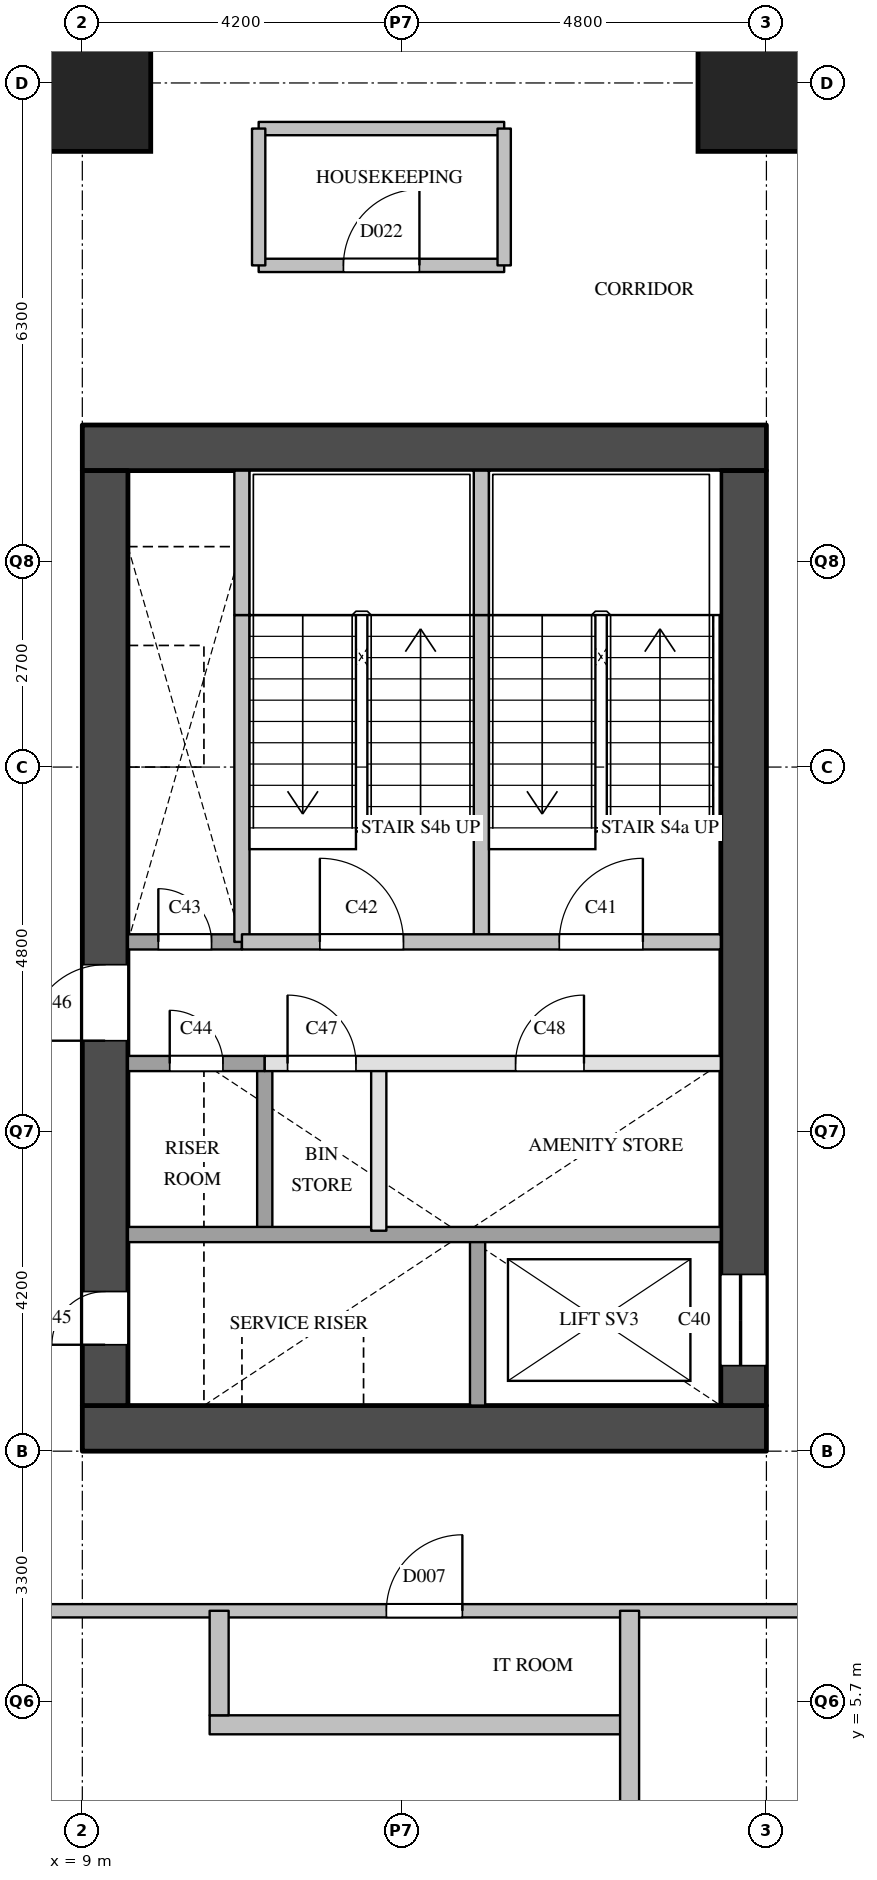
"""IFC4 building model, lengths in metres.
Left out: names, types, materials, properties, quantities, classifications, styles, units other than length and angle.
Written with IfcOpenShell. Run it as: python <this file> out.ifc"""

import sys

from ifc_helpers import new_model, si_unit, direction, frame, frame_2d, origin, origin_2d, place, context, subcontext, project, spatial, rectangle, extrude, element, fill, save


model = new_model("IFC4")
c1 = context("Model", 3, precision=1e-05, world=origin(), true_north=direction((0.0, 1.0)))
c2 = subcontext(c1, "Body", "Model", "MODEL_VIEW")
j1 = project(units=[si_unit("LENGTHUNIT", "METRE"), si_unit("PLANEANGLEUNIT", "RADIAN")], contexts=[c1])
p1 = place(None, origin())
s1 = spatial("IfcSite", under=j1, at=p1, CompositionType="ELEMENT")
p2 = place(p1, origin())
s2 = spatial("IfcBuilding", under=s1, at=p2, CompositionType="ELEMENT")
p3 = place(p2, frame((0.0, 0.0, 53.8)))
s3 = spatial("IfcBuildingStorey", under=s2, at=p3, CompositionType="ELEMENT", Elevation=53.8)
for number, where, z_axis, x_axis in (
    (1, (9.0, 27.0, 0.0), (0.0, 0.0, 1.0), (1.0, 0.0, 0.0)),
    (2, (18.0, 27.0, 0.0), (0.0, 0.0, 1.0), (1.0, 0.0, 0.0)),
):
    element("IfcColumn", number, at=place(p3, frame(where, z_axis=z_axis, x_axis=x_axis)), inside=s3, PredefinedType="COLUMN", context=c2, shape_type="SweptSolid", body=[
        extrude(rectangle(XDim=1.8, YDim=1.8, at=origin_2d()), origin(), (0.0, 0.0, 1.0), 3.8),
    ])
for number, where, z_axis, x_axis in (
    (3, (9.0, 9.3, 0.0), (0.0, 0.0, 1.0), (1.0, 0.0, 0.0)),
    (4, (9.0, 22.2, 0.0), (0.0, 0.0, 1.0), (1.0, 0.0, 0.0)),
):
    element("IfcWall", number, at=place(p3, frame(where, z_axis=z_axis, x_axis=x_axis)), inside=s3, PredefinedType="SHEAR", context=c2, shape_type="SweptSolid", body=[
        extrude(rectangle(XDim=9.0, YDim=0.6, at=frame_2d((4.5, 0.0))), origin(), (0.0, 0.0, 1.0), 3.5),
    ])
p4 = place(p3, frame((9.3, 9.6, 0.0), z_axis=(0.0, 0.0, 1.0), x_axis=(0.0, 1.0, 0.0)))
e5 = element("IfcWall", 5, at=p4, inside=s3, PredefinedType="SHEAR", context=c2, shape_type="SweptSolid", body=[
    extrude(rectangle(XDim=12.3, YDim=0.6, at=frame_2d((6.15, 0.0))), origin(), (0.0, 0.0, 1.0), 3.5),
])
p5 = place(p4, frame((0.8, 0.0, 0.0)))
e6 = element("IfcOpeningElement", 6, at=p5, cuts=e5, PredefinedType="OPENING", context=c2, shape_type="SweptSolid", body=[
    extrude(rectangle(XDim=0.7, YDim=2.1, at=frame_2d((0.35, 1.05))), frame((0.0, 0.31, 0.0), z_axis=(0.0, -1.0, 0.0), x_axis=(1.0, 0.0, 0.0)), (0.0, 0.0, 1.0), 0.62),
])
p6 = place(p4, frame((4.8, 0.0, 0.0)))
e7 = element("IfcOpeningElement", 7, at=p6, cuts=e5, PredefinedType="OPENING", context=c2, shape_type="SweptSolid", body=[
    extrude(rectangle(XDim=1.0, YDim=2.1, at=frame_2d((0.5, 1.05))), frame((0.0, 0.31, 0.0), z_axis=(0.0, -1.0, 0.0), x_axis=(1.0, 0.0, 0.0)), (0.0, 0.0, 1.0), 0.62),
])
p7 = place(p3, frame((17.7, 9.6, 0.0), z_axis=(0.0, 0.0, 1.0), x_axis=(0.0, 1.0, 0.0)))
e8 = element("IfcWall", 8, at=p7, inside=s3, PredefinedType="SHEAR", context=c2, shape_type="SweptSolid", body=[
    extrude(rectangle(XDim=12.3, YDim=0.6, at=frame_2d((6.15, 0.0))), origin(), (0.0, 0.0, 1.0), 3.5),
])
p8 = place(p7, frame((0.525, 0.0, 0.0)))
e9 = element("IfcOpeningElement", 9, at=p8, cuts=e8, PredefinedType="OPENING", context=c2, shape_type="SweptSolid", body=[
    extrude(rectangle(XDim=1.2, YDim=2.1, at=frame_2d((0.6, 1.05))), frame((0.0, 0.31, 0.0), z_axis=(0.0, -1.0, 0.0), x_axis=(1.0, 0.0, 0.0)), (0.0, 0.0, 1.0), 0.62),
])
p9 = place(p3, frame((11.1, 15.7, 0.0), z_axis=(0.0, 0.0, 1.0), x_axis=(0.0, 1.0, 0.0)))
e10 = element("IfcWall", 10, at=p9, inside=s3, PredefinedType="SOLIDWALL", context=c2, shape_type="SweptSolid", body=[
    extrude(rectangle(XDim=4.3, YDim=0.2, at=frame_2d((2.15, 0.0))), origin(), (0.0, 0.0, 1.0), 3.5),
])
p10 = place(p3, frame((11.1, 20.0, 0.0), z_axis=(0.0, 0.0, 1.0), x_axis=(0.0, 1.0, 0.0)))
e11 = element("IfcWall", 11, at=p10, inside=s3, PredefinedType="SOLIDWALL", context=c2, shape_type="SweptSolid", body=[
    extrude(rectangle(XDim=1.9, YDim=0.2, at=frame_2d((0.95, 0.0))), origin(), (0.0, 0.0, 1.0), 3.5),
])
p11 = place(p3, frame((11.4, 11.9, 0.0), z_axis=(0.0, 0.0, 1.0), x_axis=(0.0, 1.0, 0.0)))
e12 = element("IfcWall", 12, at=p11, inside=s3, PredefinedType="SOLIDWALL", context=c2, shape_type="SweptSolid", body=[
    extrude(rectangle(XDim=2.2, YDim=0.2, at=frame_2d((1.1, 0.0))), origin(), (0.0, 0.0, 1.0), 3.5),
])
p12 = place(p3, frame((12.9, 11.9, 0.0), z_axis=(0.0, 0.0, 1.0), x_axis=(0.0, 1.0, 0.0)))
e13 = element("IfcWall", 13, at=p12, inside=s3, PredefinedType="PARTITIONING", context=c2, shape_type="SweptSolid", body=[
    extrude(rectangle(XDim=2.2, YDim=0.2, at=frame_2d((1.1, 0.0))), origin(), (0.0, 0.0, 1.0), 3.5),
])
p13 = place(p3, frame((14.2, 9.6, 0.0), z_axis=(0.0, 0.0, 1.0), x_axis=(0.0, 1.0, 0.0)))
e14 = element("IfcWall", 14, at=p13, inside=s3, PredefinedType="SOLIDWALL", context=c2, shape_type="SweptSolid", body=[
    extrude(rectangle(XDim=2.3, YDim=0.2, at=frame_2d((1.15, 0.0))), origin(), (0.0, 0.0, 1.0), 3.5),
])
p14 = place(p3, frame((14.25, 15.7, 0.0), z_axis=(0.0, 0.0, 1.0), x_axis=(0.0, 1.0, 0.0)))
e15 = element("IfcWall", 15, at=p14, inside=s3, PredefinedType="SOLIDWALL", context=c2, shape_type="SweptSolid", body=[
    extrude(rectangle(XDim=4.3, YDim=0.2, at=frame_2d((2.15, 0.0))), origin(), (0.0, 0.0, 1.0), 3.5),
])
p15 = place(p3, frame((14.25, 20.0, 0.0), z_axis=(0.0, 0.0, 1.0), x_axis=(0.0, 1.0, 0.0)))
e16 = element("IfcWall", 16, at=p15, inside=s3, PredefinedType="SOLIDWALL", context=c2, shape_type="SweptSolid", body=[
    extrude(rectangle(XDim=1.9, YDim=0.2, at=frame_2d((0.95, 0.0))), origin(), (0.0, 0.0, 1.0), 3.5),
])
p16 = place(p3, frame((9.6, 11.85, 0.0), z_axis=(0.0, 0.0, 1.0), x_axis=(1.0, 0.0, 0.0)))
e17 = element("IfcWall", 17, at=p16, inside=s3, PredefinedType="SOLIDWALL", context=c2, shape_type="SweptSolid", body=[
    extrude(rectangle(XDim=7.8, YDim=0.2, at=frame_2d((3.9, 0.0))), origin(), (0.0, 0.0, 1.0), 3.5),
])
p17 = place(p3, frame((11.4, 14.1, 0.0), z_axis=(0.0, 0.0, 1.0), x_axis=(1.0, 0.0, 0.0)))
e18 = element("IfcWall", 18, at=p17, inside=s3, PredefinedType="PARTITIONING", context=c2, shape_type="SweptSolid", body=[
    extrude(rectangle(XDim=6.0, YDim=0.2, at=frame_2d((3.0, 0.0))), origin(), (0.0, 0.0, 1.0), 3.5),
])
p18 = place(p17, frame((0.3, 0.0, 0.0)))
e19 = element("IfcOpeningElement", 19, at=p18, cuts=e18, PredefinedType="OPENING", context=c2, shape_type="SweptSolid", body=[
    extrude(rectangle(XDim=0.9, YDim=2.1, at=frame_2d((0.45, 1.05))), frame((0.0, 0.11, 0.0), z_axis=(0.0, -1.0, 0.0), x_axis=(1.0, 0.0, 0.0)), (0.0, 0.0, 1.0), 0.22),
])
p19 = place(p17, frame((3.3, 0.0, 0.0)))
e20 = element("IfcOpeningElement", 20, at=p19, cuts=e18, PredefinedType="OPENING", context=c2, shape_type="SweptSolid", body=[
    extrude(rectangle(XDim=0.9, YDim=2.1, at=frame_2d((0.45, 1.05))), frame((0.0, 0.11, 0.0), z_axis=(0.0, -1.0, 0.0), x_axis=(1.0, 0.0, 0.0)), (0.0, 0.0, 1.0), 0.22),
])
p20 = place(p3, frame((9.6, 14.1, 0.0), z_axis=(0.0, 0.0, 1.0), x_axis=(1.0, 0.0, 0.0)))
e21 = element("IfcWall", 21, at=p20, inside=s3, PredefinedType="SOLIDWALL", context=c2, shape_type="SweptSolid", body=[
    extrude(rectangle(XDim=1.8, YDim=0.2, at=frame_2d((0.9, 0.0))), origin(), (0.0, 0.0, 1.0), 3.5),
])
p21 = place(p20, frame((0.55, 0.0, 0.0)))
e22 = element("IfcOpeningElement", 22, at=p21, cuts=e21, PredefinedType="OPENING", context=c2, shape_type="SweptSolid", body=[
    extrude(rectangle(XDim=0.7, YDim=2.1, at=frame_2d((0.35, 1.05))), frame((0.0, 0.11, 0.0), z_axis=(0.0, -1.0, 0.0), x_axis=(1.0, 0.0, 0.0)), (0.0, 0.0, 1.0), 0.22),
])
p22 = place(p3, frame((9.6, 15.7, 0.0), z_axis=(0.0, 0.0, 1.0), x_axis=(1.0, 0.0, 0.0)))
e23 = element("IfcWall", 23, at=p22, inside=s3, PredefinedType="SOLIDWALL", context=c2, shape_type="SweptSolid", body=[
    extrude(rectangle(XDim=1.5, YDim=0.2, at=frame_2d((0.75, 0.0))), origin(), (0.0, 0.0, 1.0), 3.5),
])
p23 = place(p22, frame((0.4, 0.0, 0.0)))
e24 = element("IfcOpeningElement", 24, at=p23, cuts=e23, PredefinedType="OPENING", context=c2, shape_type="SweptSolid", body=[
    extrude(rectangle(XDim=0.7, YDim=2.1, at=frame_2d((0.35, 1.05))), frame((0.0, 0.11, 0.0), z_axis=(0.0, -1.0, 0.0), x_axis=(1.0, 0.0, 0.0)), (0.0, 0.0, 1.0), 0.22),
])
p24 = place(p3, frame((11.1, 15.7, 0.0), z_axis=(0.0, 0.0, 1.0), x_axis=(1.0, 0.0, 0.0)))
e25 = element("IfcWall", 25, at=p24, inside=s3, PredefinedType="SOLIDWALL", context=c2, shape_type="SweptSolid", body=[
    extrude(rectangle(XDim=6.3, YDim=0.2, at=frame_2d((3.15, 0.0))), origin(), (0.0, 0.0, 1.0), 3.5),
])
p25 = place(p24, frame((4.175, 0.0, 0.0)))
e26 = element("IfcOpeningElement", 26, at=p25, cuts=e25, PredefinedType="OPENING", context=c2, shape_type="SweptSolid", body=[
    extrude(rectangle(XDim=1.1, YDim=2.1, at=frame_2d((0.55, 1.05))), frame((0.0, 0.11, 0.0), z_axis=(0.0, -1.0, 0.0), x_axis=(1.0, 0.0, 0.0)), (0.0, 0.0, 1.0), 0.22),
])
p26 = place(p24, frame((1.025, 0.0, 0.0)))
e27 = element("IfcOpeningElement", 27, at=p26, cuts=e25, PredefinedType="OPENING", context=c2, shape_type="SweptSolid", body=[
    extrude(rectangle(XDim=1.1, YDim=2.1, at=frame_2d((0.55, 1.05))), frame((0.0, 0.11, 0.0), z_axis=(0.0, -1.0, 0.0), x_axis=(1.0, 0.0, 0.0)), (0.0, 0.0, 1.0), 0.22),
])
p27 = place(p3, frame((6.9, 6.9, 0.0), z_axis=(0.0, 0.0, 1.0), x_axis=(1.0, 0.0, 0.0)))
e28 = element("IfcWall", 28, at=p27, inside=s3, PredefinedType="PARTITIONING", context=c2, shape_type="SweptSolid", body=[
    extrude(rectangle(XDim=13.2, YDim=0.175, at=frame_2d((6.6, 0.0))), origin(), (0.0, 0.0, 1.0), 3.5),
])
p28 = place(p27, frame((6.1, 0.0, 0.0)))
e29 = element("IfcOpeningElement", 29, at=p28, cuts=e28, PredefinedType="OPENING", context=c2, shape_type="SweptSolid", body=[
    extrude(rectangle(XDim=1.0, YDim=2.1, at=frame_2d((0.5, 1.05))), frame((0.0, 0.097, 0.0), z_axis=(0.0, -1.0, 0.0), x_axis=(1.0, 0.0, 0.0)), (0.0, 0.0, 1.0), 0.195),
])
p29 = place(p3, frame((11.32, 24.6, 0.0), z_axis=(0.0, 0.0, 1.0), x_axis=(1.0, 0.0, 0.0)))
e30 = element("IfcWall", 30, at=p29, inside=s3, PredefinedType="PARTITIONING", context=c2, shape_type="SweptSolid", body=[
    extrude(rectangle(XDim=3.23, YDim=0.175, at=frame_2d((1.615, 0.0))), origin(), (0.0, 0.0, 1.0), 3.5),
])
p30 = place(p29, frame((1.115, 0.0, 0.0)))
e31 = element("IfcOpeningElement", 31, at=p30, cuts=e30, PredefinedType="OPENING", context=c2, shape_type="SweptSolid", body=[
    extrude(rectangle(XDim=1.0, YDim=2.1, at=frame_2d((0.5, 1.05))), frame((0.0, 0.097, 0.0), z_axis=(0.0, -1.0, 0.0), x_axis=(1.0, 0.0, 0.0)), (0.0, 0.0, 1.0), 0.195),
])
p31 = place(p3, frame((11.32, 26.4, 0.0), z_axis=(0.0, 0.0, 1.0), x_axis=(1.0, 0.0, 0.0)))
e32 = element("IfcWall", 32, at=p31, inside=s3, PredefinedType="PARTITIONING", context=c2, shape_type="SweptSolid", body=[
    extrude(rectangle(XDim=3.23, YDim=0.175, at=frame_2d((1.615, 0.0))), origin(), (0.0, 0.0, 1.0), 3.5),
])
for number, where, z_axis, x_axis in (
    (33, (11.32, 24.6, 0.0), (0.0, 0.0, 1.0), (0.0, 1.0, 0.0)),
    (34, (14.55, 24.6, 0.0), (0.0, 0.0, 1.0), (0.0, 1.0, 0.0)),
):
    element("IfcWall", number, at=place(p3, frame(where, z_axis=z_axis, x_axis=x_axis)), inside=s3, PredefinedType="PARTITIONING", context=c2, shape_type="SweptSolid", body=[
        extrude(rectangle(XDim=1.8, YDim=0.175, at=frame_2d((0.9, 0.0))), origin(), (0.0, 0.0, 1.0), 3.5),
    ])
p32 = place(p3, frame((10.675, 5.4, 0.0), z_axis=(0.0, 0.0, 1.0), x_axis=(1.0, 0.0, 0.0)))
e35 = element("IfcWall", 35, at=p32, inside=s3, PredefinedType="PARTITIONING", context=c2, shape_type="SweptSolid", body=[
    extrude(rectangle(XDim=5.525, YDim=0.25, at=frame_2d((2.762, 0.0))), origin(), (0.0, 0.0, 1.0), 3.5),
])
p33 = place(p3, frame((10.8, 5.525, 0.0), z_axis=(0.0, 0.0, 1.0), x_axis=(0.0, 1.0, 0.0)))
e36 = element("IfcWall", 36, at=p33, inside=s3, PredefinedType="PARTITIONING", context=c2, shape_type="SweptSolid", body=[
    extrude(rectangle(XDim=1.375, YDim=0.25, at=frame_2d((0.688, 0.0))), origin(), (0.0, 0.0, 1.0), 3.5),
])
p34 = place(p3, frame((16.2, 0.0, 0.0), z_axis=(0.0, 0.0, 1.0), x_axis=(0.0, 1.0, 0.0)))
e37 = element("IfcWall", 37, at=p34, inside=s3, PredefinedType="PARTITIONING", context=c2, shape_type="SweptSolid", body=[
    extrude(rectangle(XDim=6.9, YDim=0.25, at=frame_2d((3.45, 0.0))), origin(), (0.0, 0.0, 1.0), 2.5),
])
p35 = place(p8, origin())
e38 = element("IfcDoor", 38, at=p35, inside=s3, OperationType="SLIDING_TO_LEFT", PredefinedType="DOOR", context=c2, shape_type="SweptSolid", body=[
    extrude(rectangle(XDim=1.2, YDim=2.1, at=frame_2d((0.6, 1.05))), frame((0.0, 0.025, 0.0), z_axis=(0.0, -1.0, 0.0), x_axis=(1.0, 0.0, 0.0)), (0.0, 0.0, 1.0), 0.05),
])
fill(e9, e38)
p36 = place(p25, origin())
e39 = element("IfcDoor", 39, at=p36, inside=s3, OperationType="SINGLE_SWING_RIGHT", PredefinedType="DOOR", context=c2, shape_type="SweptSolid", body=[
    extrude(rectangle(XDim=1.1, YDim=2.1, at=frame_2d((0.55, 1.05))), frame((0.0, 0.025, 0.0), z_axis=(0.0, -1.0, 0.0), x_axis=(1.0, 0.0, 0.0)), (0.0, 0.0, 1.0), 0.05),
])
fill(e26, e39)
p37 = place(p26, origin())
e40 = element("IfcDoor", 40, at=p37, inside=s3, OperationType="SINGLE_SWING_LEFT", PredefinedType="DOOR", context=c2, shape_type="SweptSolid", body=[
    extrude(rectangle(XDim=1.1, YDim=2.1, at=frame_2d((0.55, 1.05))), frame((0.0, 0.025, 0.0), z_axis=(0.0, -1.0, 0.0), x_axis=(1.0, 0.0, 0.0)), (0.0, 0.0, 1.0), 0.05),
])
fill(e27, e40)
p38 = place(p23, origin())
e41 = element("IfcDoor", 41, at=p38, inside=s3, OperationType="SINGLE_SWING_LEFT", PredefinedType="DOOR", context=c2, shape_type="SweptSolid", body=[
    extrude(rectangle(XDim=0.7, YDim=2.1, at=frame_2d((0.35, 1.05))), frame((0.0, 0.025, 0.0), z_axis=(0.0, -1.0, 0.0), x_axis=(1.0, 0.0, 0.0)), (0.0, 0.0, 1.0), 0.05),
])
fill(e24, e41)
p39 = place(p21, origin())
e42 = element("IfcDoor", 42, at=p39, inside=s3, OperationType="SINGLE_SWING_LEFT", PredefinedType="DOOR", context=c2, shape_type="SweptSolid", body=[
    extrude(rectangle(XDim=0.7, YDim=2.1, at=frame_2d((0.35, 1.05))), frame((0.0, 0.025, 0.0), z_axis=(0.0, -1.0, 0.0), x_axis=(1.0, 0.0, 0.0)), (0.0, 0.0, 1.0), 0.05),
])
fill(e22, e42)
p40 = place(p5, origin())
e43 = element("IfcDoor", 43, at=p40, inside=s3, OperationType="SINGLE_SWING_LEFT", PredefinedType="DOOR", context=c2, shape_type="SweptSolid", body=[
    extrude(rectangle(XDim=0.7, YDim=2.1, at=frame_2d((0.35, 1.05))), frame((0.0, 0.025, 0.0), z_axis=(0.0, -1.0, 0.0), x_axis=(1.0, 0.0, 0.0)), (0.0, 0.0, 1.0), 0.05),
])
fill(e6, e43)
p41 = place(p6, origin())
e44 = element("IfcDoor", 44, at=p41, inside=s3, OperationType="SINGLE_SWING_LEFT", PredefinedType="DOOR", context=c2, shape_type="SweptSolid", body=[
    extrude(rectangle(XDim=1.0, YDim=2.1, at=frame_2d((0.5, 1.05))), frame((0.0, 0.025, 0.0), z_axis=(0.0, -1.0, 0.0), x_axis=(1.0, 0.0, 0.0)), (0.0, 0.0, 1.0), 0.05),
])
fill(e7, e44)
p42 = place(p18, origin())
e45 = element("IfcDoor", 45, at=p42, inside=s3, OperationType="SINGLE_SWING_LEFT", PredefinedType="DOOR", context=c2, shape_type="SweptSolid", body=[
    extrude(rectangle(XDim=0.9, YDim=2.1, at=frame_2d((0.45, 1.05))), frame((0.0, 0.025, 0.0), z_axis=(0.0, -1.0, 0.0), x_axis=(1.0, 0.0, 0.0)), (0.0, 0.0, 1.0), 0.05),
])
fill(e19, e45)
p43 = place(p19, origin())
e46 = element("IfcDoor", 46, at=p43, inside=s3, OperationType="SINGLE_SWING_RIGHT", PredefinedType="DOOR", context=c2, shape_type="SweptSolid", body=[
    extrude(rectangle(XDim=0.9, YDim=2.1, at=frame_2d((0.45, 1.05))), frame((0.0, 0.025, 0.0), z_axis=(0.0, -1.0, 0.0), x_axis=(1.0, 0.0, 0.0)), (0.0, 0.0, 1.0), 0.05),
])
fill(e20, e46)
p44 = place(p28, origin())
e47 = element("IfcDoor", 47, at=p44, inside=s3, OperationType="SINGLE_SWING_RIGHT", PredefinedType="DOOR", context=c2, shape_type="SweptSolid", body=[
    extrude(rectangle(XDim=1.0, YDim=2.1, at=frame_2d((0.5, 1.05))), frame((0.0, 0.025, 0.0), z_axis=(0.0, -1.0, 0.0), x_axis=(1.0, 0.0, 0.0)), (0.0, 0.0, 1.0), 0.05),
])
fill(e29, e47)
p45 = place(p30, origin())
e48 = element("IfcDoor", 48, at=p45, inside=s3, OperationType="SINGLE_SWING_RIGHT", PredefinedType="DOOR", context=c2, shape_type="SweptSolid", body=[
    extrude(rectangle(XDim=1.0, YDim=2.1, at=frame_2d((0.5, 1.05))), frame((0.0, 0.025, 0.0), z_axis=(0.0, -1.0, 0.0), x_axis=(1.0, 0.0, 0.0)), (0.0, 0.0, 1.0), 0.05),
])
fill(e31, e48)
save(model, sys.argv[1])
